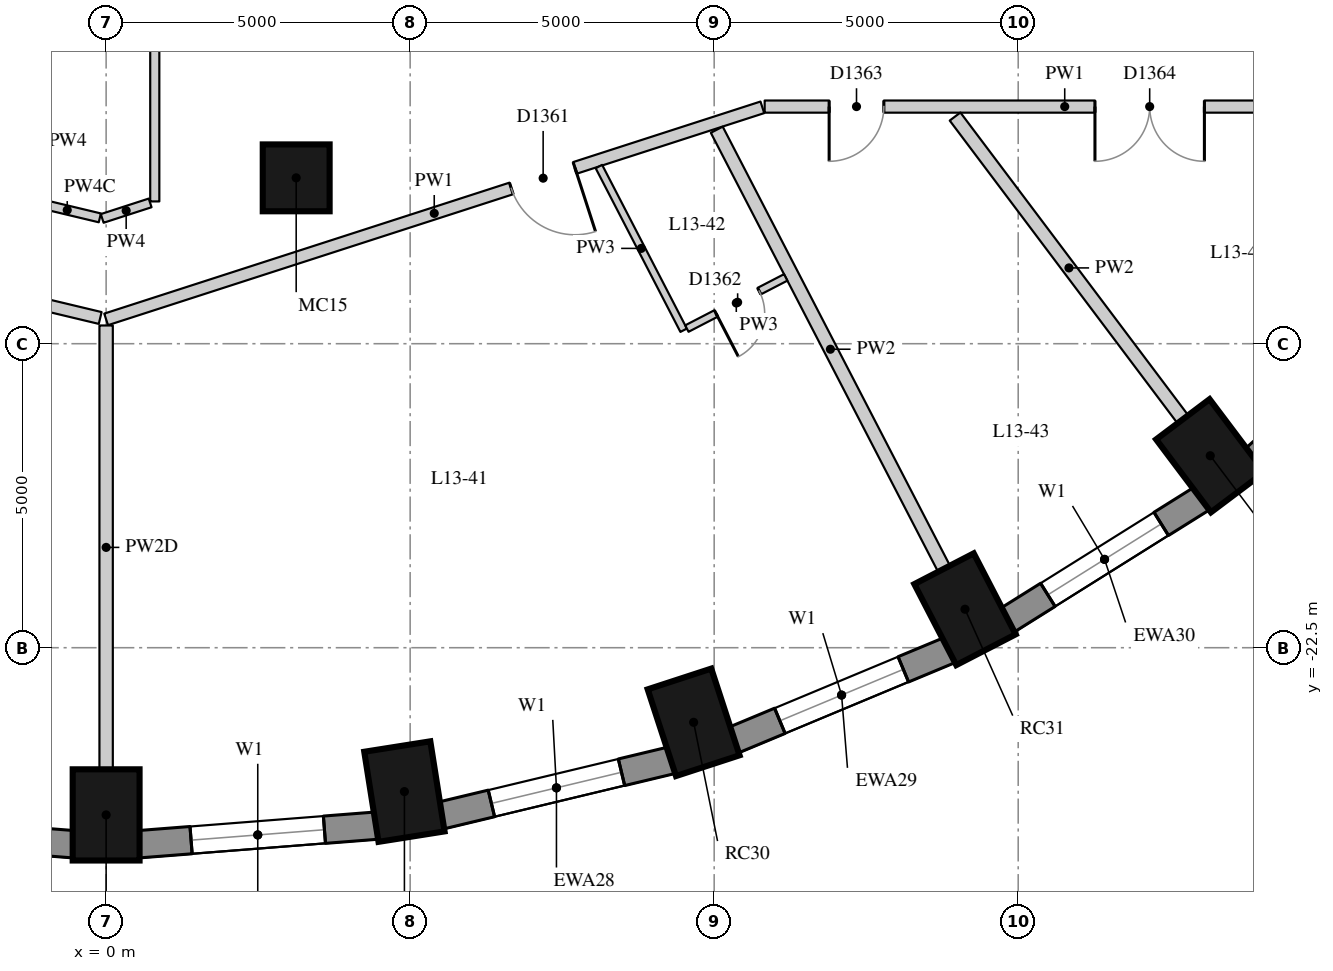
"""IFC4 building model, lengths in metres.
Left out: names, types, materials, properties, quantities, classifications, styles, units other than length and angle.
Written with IfcOpenShell. Run it as: python <this file> out.ifc"""

import sys

from ifc_helpers import new_model, si_unit, direction, frame, frame_2d, origin, origin_2d, place, context, subcontext, project, spatial, rectangle, extrude, element, fill, save


model = new_model("IFC4")
c1 = context("Model", 3, precision=1e-05, world=origin(), true_north=direction((0.0, 1.0)))
c2 = subcontext(c1, "Body", "Model", "MODEL_VIEW")
j1 = project(units=[si_unit("LENGTHUNIT", "METRE"), si_unit("PLANEANGLEUNIT", "RADIAN")], contexts=[c1])
p1 = place(None, origin())
s1 = spatial("IfcSite", under=j1, at=p1, CompositionType="ELEMENT")
p2 = place(p1, origin())
s2 = spatial("IfcBuilding", under=s1, at=p2, CompositionType="ELEMENT")
p3 = place(p2, frame((0.0, 0.0, 51.4)))
s3 = spatial("IfcBuildingStorey", under=s2, at=p3, CompositionType="ELEMENT", Elevation=51.4)
for number, where, z_axis, x_axis in (
    (1, (0.0, -25.25, 0.0), (0.0, 0.0, 1.0), (0.0, -1.0, 0.0)),
    (2, (4.906, -24.866, 0.0), (0.0, 0.0, 1.0), (0.156, -0.988, 0.0)),
    (3, (9.662, -23.727, 0.0), (0.0, 0.0, 1.0), (0.31, -0.951, 0.0)),
    (4, (14.125, -21.867, 0.0), (0.0, 0.0, 1.0), (0.46, -0.888, 0.0)),
    (5, (18.159, -19.343, 0.0), (0.0, 0.0, 1.0), (0.601, -0.799, 0.0)),
):
    element("IfcColumn", number, at=place(p3, frame(where, z_axis=z_axis, x_axis=x_axis)), inside=s3, PredefinedType="COLUMN", context=c2, shape_type="SweptSolid", body=[
        extrude(rectangle(XDim=1.5, YDim=1.1, at=origin_2d()), origin(), (0.0, 0.0, 1.0), 3.3),
    ])
p4 = place(p3, frame((3.126, -14.772, 0.0), z_axis=(0.0, 0.0, 1.0), x_axis=(1.0, 0.0, 0.0)))
e6 = element("IfcColumn", 6, at=p4, inside=s3, PredefinedType="COLUMN", context=c2, shape_type="SweptSolid", body=[
    extrude(rectangle(XDim=1.1, YDim=1.1, at=origin_2d()), origin(), (0.0, 0.0, 1.0), 3.3),
])
p5 = place(p3, frame((-4.457, -25.426, 0.0), z_axis=(0.0, 0.0, 1.0), x_axis=(0.996955972145, -0.077966592873, 0.0)))
e7 = element("IfcWall", 7, at=p5, inside=s3, PredefinedType="SOLIDWALL", context=c2, shape_type="SweptSolid", body=[
    extrude(rectangle(XDim=3.939, YDim=0.45, at=frame_2d((1.97, 0.0))), origin(), (0.0, 0.0, 1.0), 3.02),
])
p6 = place(p5, frame((0.87, 0.0, 0.4)))
e8 = element("IfcOpeningElement", 8, at=p6, cuts=e7, PredefinedType="OPENING", context=c2, shape_type="SweptSolid", body=[
    extrude(rectangle(XDim=2.2, YDim=1.75, at=frame_2d((1.1, 0.875))), frame((0.0, 0.235, 0.0), z_axis=(0.0, -1.0, 0.0), x_axis=(1.0, 0.0, 0.0)), (0.0, 0.0, 1.0), 0.47),
])
p7 = place(p3, frame((0.53, -25.733, 0.0), z_axis=(0.0, 0.0, 1.0), x_axis=(0.996955972145, 0.077966592873, 0.0)))
e9 = element("IfcWall", 9, at=p7, inside=s3, PredefinedType="SOLIDWALL", context=c2, shape_type="SweptSolid", body=[
    extrude(rectangle(XDim=3.939, YDim=0.45, at=frame_2d((1.97, 0.0))), origin(), (0.0, 0.0, 1.0), 3.02),
])
p8 = place(p7, frame((0.87, 0.0, 0.4)))
e10 = element("IfcOpeningElement", 10, at=p8, cuts=e9, PredefinedType="OPENING", context=c2, shape_type="SweptSolid", body=[
    extrude(rectangle(XDim=2.2, YDim=1.75, at=frame_2d((1.1, 0.875))), frame((0.0, 0.235, 0.0), z_axis=(0.0, -1.0, 0.0), x_axis=(1.0, 0.0, 0.0)), (0.0, 0.0, 1.0), 0.47),
])
p9 = place(p3, frame((5.504, -25.26, 0.0), z_axis=(0.0, 0.0, 1.0), x_axis=(0.972496561493, 0.232917233979, 0.0)))
e11 = element("IfcWall", 11, at=p9, inside=s3, PredefinedType="SOLIDWALL", context=c2, shape_type="SweptSolid", body=[
    extrude(rectangle(XDim=3.911, YDim=0.45, at=frame_2d((1.956, 0.0))), origin(), (0.0, 0.0, 1.0), 3.02),
])
p10 = place(p9, frame((0.855, 0.0, 0.4)))
e12 = element("IfcOpeningElement", 12, at=p10, cuts=e11, PredefinedType="OPENING", context=c2, shape_type="SweptSolid", body=[
    extrude(rectangle(XDim=2.2, YDim=1.75, at=frame_2d((1.1, 0.875))), frame((0.0, 0.235, 0.0), z_axis=(0.0, -1.0, 0.0), x_axis=(1.0, 0.0, 0.0)), (0.0, 0.0, 1.0), 0.47),
])
p11 = place(p3, frame((10.315, -24.021, 0.0), z_axis=(0.0, 0.0, 1.0), x_axis=(0.923031964282, 0.384723267966, 0.0)))
e13 = element("IfcWall", 13, at=p11, inside=s3, PredefinedType="SOLIDWALL", context=c2, shape_type="SweptSolid", body=[
    extrude(rectangle(XDim=3.856, YDim=0.45, at=frame_2d((1.928, 0.0))), origin(), (0.0, 0.0, 1.0), 3.02),
])
p12 = place(p11, frame((0.828, 0.0, 0.4)))
e14 = element("IfcOpeningElement", 14, at=p12, cuts=e13, PredefinedType="OPENING", context=c2, shape_type="SweptSolid", body=[
    extrude(rectangle(XDim=2.2, YDim=1.75, at=frame_2d((1.1, 0.875))), frame((0.0, 0.235, 0.0), z_axis=(0.0, -1.0, 0.0), x_axis=(1.0, 0.0, 0.0)), (0.0, 0.0, 1.0), 0.47),
])
p13 = place(p3, frame((14.817, -22.051, 0.0), z_axis=(0.0, 0.0, 1.0), x_axis=(0.847635480093, 0.530579016629, 0.0)))
e15 = element("IfcWall", 15, at=p13, inside=s3, PredefinedType="SOLIDWALL", context=c2, shape_type="SweptSolid", body=[
    extrude(rectangle(XDim=3.782, YDim=0.45, at=frame_2d((1.891, 0.0))), origin(), (0.0, 0.0, 1.0), 3.02),
])
p14 = place(p13, frame((0.791, 0.0, 0.4)))
e16 = element("IfcOpeningElement", 16, at=p14, cuts=e15, PredefinedType="OPENING", context=c2, shape_type="SweptSolid", body=[
    extrude(rectangle(XDim=2.2, YDim=1.75, at=frame_2d((1.1, 0.875))), frame((0.0, 0.235, 0.0), z_axis=(0.0, -1.0, 0.0), x_axis=(1.0, 0.0, 0.0)), (0.0, 0.0, 1.0), 0.47),
])
p15 = place(p3, frame((18.871, -19.407, 0.0), z_axis=(0.0, 0.0, 1.0), x_axis=(0.745526233716, 0.66647628228, 0.0)))
e17 = element("IfcWall", 17, at=p15, inside=s3, PredefinedType="SOLIDWALL", context=c2, shape_type="SweptSolid", body=[
    extrude(rectangle(XDim=3.697, YDim=0.45, at=frame_2d((1.848, 0.0))), origin(), (0.0, 0.0, 1.0), 3.02),
])
p16 = place(p3, frame((20.7, -13.6, 0.0), z_axis=(0.0, 0.0, 1.0), x_axis=(-1.0, 0.0, 0.0)))
e18 = element("IfcWall", 18, at=p16, inside=s3, PredefinedType="PARTITIONING", context=c2, shape_type="SweptSolid", body=[
    extrude(rectangle(XDim=9.87, YDim=0.2, at=frame_2d((4.935, 0.0))), origin(), (0.0, 0.0, 1.0), 3.02),
])
p17 = place(p16, frame((7.909, 0.0, 0.0)))
e19 = element("IfcOpeningElement", 19, at=p17, cuts=e18, PredefinedType="OPENING", context=c2, shape_type="SweptSolid", body=[
    extrude(rectangle(XDim=0.9, YDim=2.1, at=frame_2d((0.45, 1.05))), frame((0.0, 0.11, 0.0), z_axis=(0.0, -1.0, 0.0), x_axis=(1.0, 0.0, 0.0)), (0.0, 0.0, 1.0), 0.22),
])
p18 = place(p16, frame((2.638, 0.0, 0.0)))
e20 = element("IfcOpeningElement", 20, at=p18, cuts=e18, PredefinedType="OPENING", context=c2, shape_type="SweptSolid", body=[
    extrude(rectangle(XDim=1.8, YDim=2.1, at=frame_2d((0.9, 1.05))), frame((0.0, 0.11, 0.0), z_axis=(0.0, -1.0, 0.0), x_axis=(1.0, 0.0, 0.0)), (0.0, 0.0, 1.0), 0.22),
])
p19 = place(p3, frame((10.792, -13.612, 0.0), z_axis=(0.0, 0.0, 1.0), x_axis=(-0.951542928403, -0.307515943336, 0.0)))
e21 = element("IfcWall", 21, at=p19, inside=s3, PredefinedType="PARTITIONING", context=c2, shape_type="SweptSolid", body=[
    extrude(rectangle(XDim=11.342, YDim=0.2, at=frame_2d((5.671, 0.0))), origin(), (0.0, 0.0, 1.0), 3.02),
])
p20 = place(p19, frame((3.239, 0.0, 0.0)))
e22 = element("IfcOpeningElement", 22, at=p20, cuts=e21, PredefinedType="OPENING", context=c2, shape_type="SweptSolid", body=[
    extrude(rectangle(XDim=1.1, YDim=2.1, at=frame_2d((0.55, 1.05))), frame((0.0, 0.11, 0.0), z_axis=(0.0, -1.0, 0.0), x_axis=(1.0, 0.0, 0.0)), (0.0, 0.0, 1.0), 0.22),
])
p21 = place(p3, frame((-0.098, -17.077, 0.0), z_axis=(0.0, 0.0, 1.0), x_axis=(-0.972607318404, 0.232454305588, 0.0)))
e23 = element("IfcWall", 23, at=p21, inside=s3, PredefinedType="PARTITIONING", context=c2, shape_type="SweptSolid", body=[
    extrude(rectangle(XDim=8.022, YDim=0.2, at=frame_2d((4.011, 0.0))), origin(), (0.0, 0.0, 1.0), 3.02),
])
p22 = place(p21, frame((1.479, 0.0, 0.0)))
e24 = element("IfcOpeningElement", 24, at=p22, cuts=e23, PredefinedType="OPENING", context=c2, shape_type="SweptSolid", body=[
    extrude(rectangle(XDim=1.1, YDim=2.1, at=frame_2d((0.55, 1.05))), frame((0.0, 0.11, 0.0), z_axis=(0.0, -1.0, 0.0), x_axis=(1.0, 0.0, 0.0)), (0.0, 0.0, 1.0), 0.22),
])
p23 = place(p3, frame((0.8, -9.23, 0.0), z_axis=(0.0, 0.0, 1.0), x_axis=(0.0, -1.0, 0.0)))
e25 = element("IfcWall", 25, at=p23, inside=s3, PredefinedType="PARTITIONING", context=c2, shape_type="SweptSolid", body=[
    extrude(rectangle(XDim=5.93, YDim=0.15, at=frame_2d((2.965, 0.0))), origin(), (0.0, 0.0, 1.0), 3.02),
])
p24 = place(p23, frame((2.515, 0.0, 0.0)))
e26 = element("IfcOpeningElement", 26, at=p24, cuts=e25, PredefinedType="OPENING", context=c2, shape_type="SweptSolid", body=[
    extrude(rectangle(XDim=0.9, YDim=2.1, at=frame_2d((0.45, 1.05))), frame((0.0, 0.085, 0.0), z_axis=(0.0, -1.0, 0.0), x_axis=(1.0, 0.0, 0.0)), (0.0, 0.0, 1.0), 0.17),
])
p25 = place(p3, frame((0.724, -15.184, 0.0), z_axis=(0.0, 0.0, 1.0), x_axis=(-0.951444518554, -0.307820285415, 0.0)))
e27 = element("IfcWall", 27, at=p25, inside=s3, PredefinedType="PARTITIONING", context=c2, shape_type="SweptSolid", body=[
    extrude(rectangle(XDim=0.829, YDim=0.15, at=frame_2d((0.415, 0.0))), origin(), (0.0, 0.0, 1.0), 3.02),
])
p26 = place(p3, frame((-0.104, -15.43, 0.0), z_axis=(0.0, 0.0, 1.0), x_axis=(-0.972630060885, 0.232359128642, 0.0)))
e28 = element("IfcWall", 28, at=p26, inside=s3, PredefinedType="PARTITIONING", context=c2, shape_type="SweptSolid", body=[
    extrude(rectangle(XDim=1.102, YDim=0.15, at=frame_2d((0.551, 0.0))), origin(), (0.0, 0.0, 1.0), 2.42),
])
p27 = place(p3, frame((0.0, -24.5, 0.0), z_axis=(0.0, 0.0, 1.0), x_axis=(0.0, 1.0, 0.0)))
e29 = element("IfcWall", 29, at=p27, inside=s3, PredefinedType="PARTITIONING", context=c2, shape_type="SweptSolid", body=[
    extrude(rectangle(XDim=7.3, YDim=0.22, at=frame_2d((3.65, 0.0))), origin(), (0.0, 0.0, 1.0), 2.47),
])
p28 = place(p3, frame((13.78, -21.201, 0.0), z_axis=(0.0, 0.0, 1.0), x_axis=(-0.459685115008, 0.888081975405, 0.0)))
e30 = element("IfcWall", 30, at=p28, inside=s3, PredefinedType="PARTITIONING", context=c2, shape_type="SweptSolid", body=[
    extrude(rectangle(XDim=8.131, YDim=0.22, at=frame_2d((4.065, 0.0))), origin(), (0.0, 0.0, 1.0), 3.02),
])
p29 = place(p3, frame((17.708, -18.743, 0.0), z_axis=(0.0, 0.0, 1.0), x_axis=(-0.601177883261, 0.799115231164, 0.0)))
e31 = element("IfcWall", 31, at=p29, inside=s3, PredefinedType="PARTITIONING", context=c2, shape_type="SweptSolid", body=[
    extrude(rectangle(XDim=6.231, YDim=0.22, at=frame_2d((3.116, 0.0))), origin(), (0.0, 0.0, 1.0), 3.02),
])
p30 = place(p3, frame((8.104, -14.586, 0.0), z_axis=(0.0, 0.0, 1.0), x_axis=(0.459668270166, -0.888090694357, 0.0)))
e32 = element("IfcWall", 32, at=p30, inside=s3, PredefinedType="PARTITIONING", context=c2, shape_type="SweptSolid", body=[
    extrude(rectangle(XDim=3.032, YDim=0.12, at=frame_2d((1.516, 0.0))), origin(), (0.0, 0.0, 1.0), 3.02),
])
p31 = place(p3, frame((9.551, -17.251, 0.0), z_axis=(0.0, 0.0, 1.0), x_axis=(0.88806930088, 0.459709600546, 0.0)))
e33 = element("IfcWall", 33, at=p31, inside=s3, PredefinedType="PARTITIONING", context=c2, shape_type="SweptSolid", body=[
    extrude(rectangle(XDim=1.83, YDim=0.12, at=frame_2d((0.915, 0.0))), origin(), (0.0, 0.0, 1.0), 3.02),
])
p32 = place(p31, frame((0.54, 0.0, 0.0)))
e34 = element("IfcOpeningElement", 34, at=p32, cuts=e33, PredefinedType="OPENING", context=c2, shape_type="SweptSolid", body=[
    extrude(rectangle(XDim=0.8, YDim=2.1, at=frame_2d((0.4, 1.05))), frame((0.0, 0.07, 0.0), z_axis=(0.0, -1.0, 0.0), x_axis=(1.0, 0.0, 0.0)), (0.0, 0.0, 1.0), 0.14),
])
p33 = place(p8, origin())
e35 = element("IfcWindow", 35, at=p33, inside=s3, PartitioningType="SINGLE_PANEL", PredefinedType="WINDOW", context=c2, shape_type="SweptSolid", body=[
    extrude(rectangle(XDim=2.2, YDim=1.75, at=frame_2d((1.1, 0.875))), frame((0.0, 0.035, 0.0), z_axis=(0.0, -1.0, 0.0), x_axis=(1.0, 0.0, 0.0)), (0.0, 0.0, 1.0), 0.06),
])
fill(e10, e35)
p34 = place(p10, origin())
e36 = element("IfcWindow", 36, at=p34, inside=s3, PartitioningType="SINGLE_PANEL", PredefinedType="WINDOW", context=c2, shape_type="SweptSolid", body=[
    extrude(rectangle(XDim=2.2, YDim=1.75, at=frame_2d((1.1, 0.875))), frame((0.0, 0.035, 0.0), z_axis=(0.0, -1.0, 0.0), x_axis=(1.0, 0.0, 0.0)), (0.0, 0.0, 1.0), 0.06),
])
fill(e12, e36)
p35 = place(p12, origin())
e37 = element("IfcWindow", 37, at=p35, inside=s3, PartitioningType="SINGLE_PANEL", PredefinedType="WINDOW", context=c2, shape_type="SweptSolid", body=[
    extrude(rectangle(XDim=2.2, YDim=1.75, at=frame_2d((1.1, 0.875))), frame((0.0, 0.035, 0.0), z_axis=(0.0, -1.0, 0.0), x_axis=(1.0, 0.0, 0.0)), (0.0, 0.0, 1.0), 0.06),
])
fill(e14, e37)
p36 = place(p14, origin())
e38 = element("IfcWindow", 38, at=p36, inside=s3, PartitioningType="SINGLE_PANEL", PredefinedType="WINDOW", context=c2, shape_type="SweptSolid", body=[
    extrude(rectangle(XDim=2.2, YDim=1.75, at=frame_2d((1.1, 0.875))), frame((0.0, 0.035, 0.0), z_axis=(0.0, -1.0, 0.0), x_axis=(1.0, 0.0, 0.0)), (0.0, 0.0, 1.0), 0.06),
])
fill(e16, e38)
p37 = place(p20, origin())
e39 = element("IfcDoor", 39, at=p37, inside=s3, OperationType="SINGLE_SWING_LEFT", PredefinedType="DOOR", context=c2, shape_type="SweptSolid", body=[
    extrude(rectangle(XDim=1.1, YDim=2.1, at=frame_2d((0.55, 1.05))), frame((0.0, 0.025, 0.0), z_axis=(0.0, -1.0, 0.0), x_axis=(1.0, 0.0, 0.0)), (0.0, 0.0, 1.0), 0.05),
])
fill(e22, e39)
p38 = place(p32, origin())
e40 = element("IfcDoor", 40, at=p38, inside=s3, OperationType="SINGLE_SWING_RIGHT", PredefinedType="DOOR", context=c2, shape_type="SweptSolid", body=[
    extrude(rectangle(XDim=0.8, YDim=2.1, at=frame_2d((0.4, 1.05))), frame((0.0, 0.025, 0.0), z_axis=(0.0, -1.0, 0.0), x_axis=(1.0, 0.0, 0.0)), (0.0, 0.0, 1.0), 0.05),
])
fill(e34, e40)
p39 = place(p17, origin())
e41 = element("IfcDoor", 41, at=p39, inside=s3, OperationType="SINGLE_SWING_RIGHT", PredefinedType="DOOR", context=c2, shape_type="SweptSolid", body=[
    extrude(rectangle(XDim=0.9, YDim=2.1, at=frame_2d((0.45, 1.05))), frame((0.0, 0.025, 0.0), z_axis=(0.0, -1.0, 0.0), x_axis=(1.0, 0.0, 0.0)), (0.0, 0.0, 1.0), 0.05),
])
fill(e19, e41)
p40 = place(p18, origin())
e42 = element("IfcDoor", 42, at=p40, inside=s3, OperationType="DOUBLE_DOOR_SINGLE_SWING", PredefinedType="DOOR", context=c2, shape_type="SweptSolid", body=[
    extrude(rectangle(XDim=1.8, YDim=2.1, at=frame_2d((0.9, 1.05))), frame((0.0, 0.025, 0.0), z_axis=(0.0, -1.0, 0.0), x_axis=(1.0, 0.0, 0.0)), (0.0, 0.0, 1.0), 0.05),
])
fill(e20, e42)
save(model, sys.argv[1])
